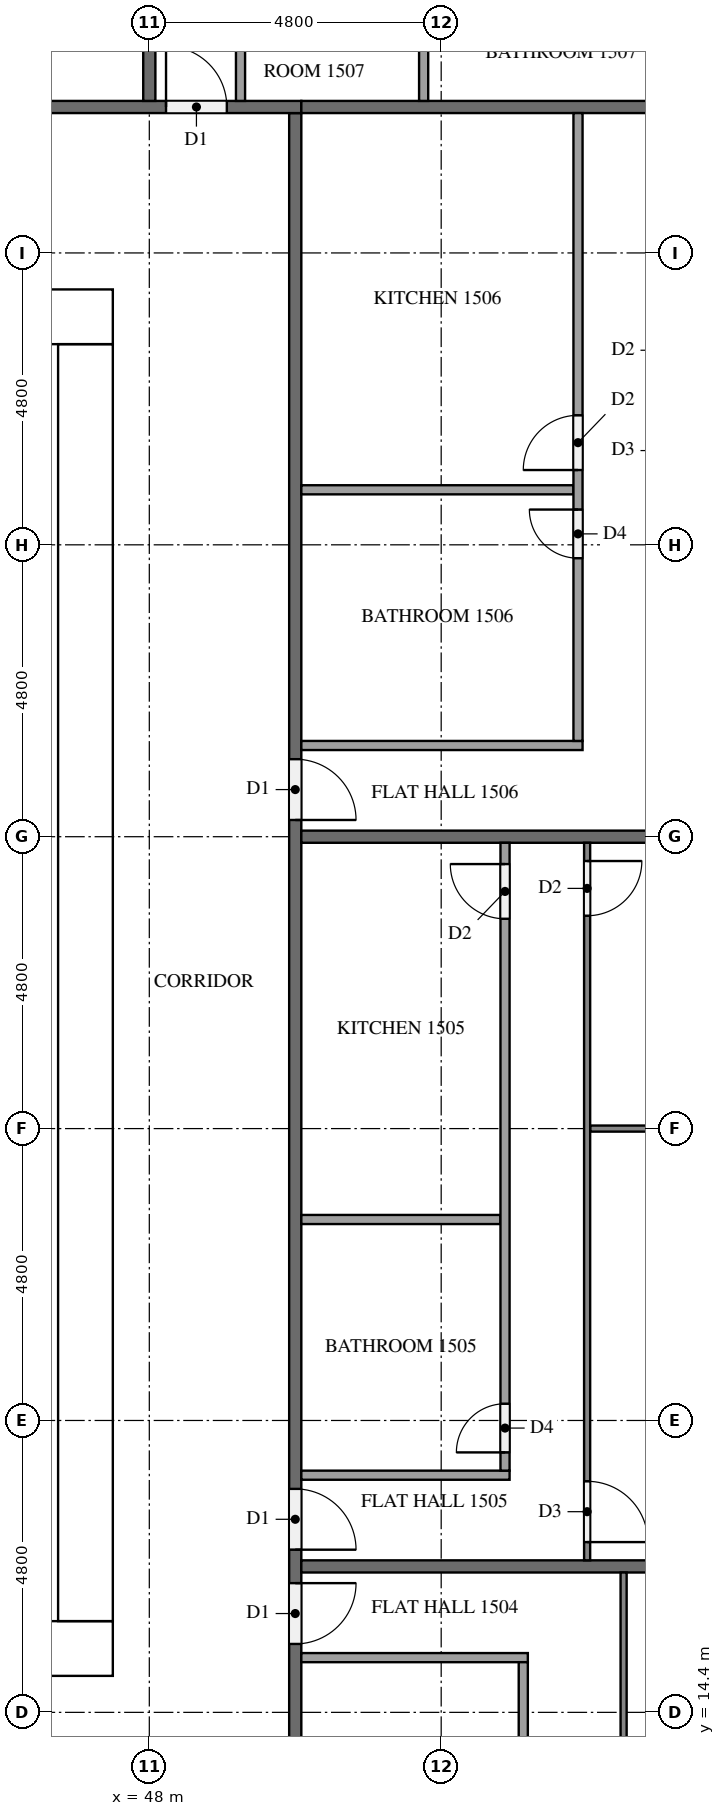
"""IFC4 building model, lengths in metres.
Left out: names, types, materials, properties, quantities, classifications, styles, units other than length and angle.
Written with IfcOpenShell. Run it as: python <this file> out.ifc"""

import sys

from ifc_helpers import new_model, si_unit, direction, frame, frame_2d, origin, place, context, subcontext, project, spatial, rectangle, extrude, element, fill, save


model = new_model("IFC4")
c1 = context("Model", 3, precision=1e-05, world=origin(), true_north=direction((0.0, 1.0)))
c2 = subcontext(c1, "Body", "Model", "MODEL_VIEW")
j1 = project(units=[si_unit("LENGTHUNIT", "METRE"), si_unit("PLANEANGLEUNIT", "RADIAN")], contexts=[c1])
p1 = place(None, origin())
s1 = spatial("IfcSite", under=j1, at=p1, CompositionType="ELEMENT")
p2 = place(p1, origin())
s2 = spatial("IfcBuilding", under=s1, at=p2, CompositionType="ELEMENT")
p3 = place(p2, frame((0.0, 0.0, 62.8)))
s3 = spatial("IfcBuildingStorey", under=s2, at=p3, CompositionType="ELEMENT", Elevation=62.8)
p4 = place(p3, frame((15.0, 15.45, 0.0), z_axis=(0.0, 0.0, 1.0), x_axis=(1.0, 0.0, 0.0)))
e1 = element("IfcWall", 1, at=p4, inside=s3, PredefinedType="SHEAR", context=c2, shape_type="SweptSolid", body=[
    extrude(rectangle(XDim=32.4, YDim=0.9, at=frame_2d((16.2, 0.0))), origin(), (0.0, 0.0, 1.0), 3.2),
])
p5 = place(p4, frame((15.3, 0.0, 0.0)))
e2 = element("IfcOpeningElement", 2, at=p5, cuts=e1, PredefinedType="OPENING", context=c2, shape_type="SweptSolid", body=[
    extrude(rectangle(XDim=1.8, YDim=2.1, at=frame_2d((0.9, 1.05))), frame((0.0, 0.46, 0.0), z_axis=(0.0, -1.0, 0.0), x_axis=(1.0, 0.0, 0.0)), (0.0, 0.0, 1.0), 0.92),
])
p6 = place(p3, frame((15.0, 37.35, 0.0), z_axis=(0.0, 0.0, 1.0), x_axis=(1.0, 0.0, 0.0)))
e3 = element("IfcWall", 3, at=p6, inside=s3, PredefinedType="SHEAR", context=c2, shape_type="SweptSolid", body=[
    extrude(rectangle(XDim=32.4, YDim=0.9, at=frame_2d((16.2, 0.0))), origin(), (0.0, 0.0, 1.0), 3.2),
])
p7 = place(p6, frame((15.3, 0.0, 0.0)))
e4 = element("IfcOpeningElement", 4, at=p7, cuts=e3, PredefinedType="OPENING", context=c2, shape_type="SweptSolid", body=[
    extrude(rectangle(XDim=1.8, YDim=2.1, at=frame_2d((0.9, 1.05))), frame((0.0, 0.46, 0.0), z_axis=(0.0, -1.0, 0.0), x_axis=(1.0, 0.0, 0.0)), (0.0, 0.0, 1.0), 0.92),
])
p8 = place(p6, frame((1.794, 0.0, 0.0)))
e5 = element("IfcOpeningElement", 5, at=p8, cuts=e3, PredefinedType="OPENING", context=c2, shape_type="SweptSolid", body=[
    extrude(rectangle(XDim=1.0, YDim=2.1, at=frame_2d((0.5, 1.05))), frame((0.0, 0.46, 0.0), z_axis=(0.0, -1.0, 0.0), x_axis=(1.0, 0.0, 0.0)), (0.0, 0.0, 1.0), 0.92),
])
p9 = place(p6, frame((5.331, 0.0, 0.0)))
e6 = element("IfcOpeningElement", 6, at=p9, cuts=e3, PredefinedType="OPENING", context=c2, shape_type="SweptSolid", body=[
    extrude(rectangle(XDim=1.0, YDim=2.1, at=frame_2d((0.5, 1.05))), frame((0.0, 0.46, 0.0), z_axis=(0.0, -1.0, 0.0), x_axis=(1.0, 0.0, 0.0)), (0.0, 0.0, 1.0), 0.92),
])
p10 = place(p3, frame((46.95, 15.9, 0.0), z_axis=(0.0, 0.0, 1.0), x_axis=(0.0, 1.0, 0.0)))
e7 = element("IfcWall", 7, at=p10, inside=s3, PredefinedType="SHEAR", context=c2, shape_type="SweptSolid", body=[
    extrude(rectangle(XDim=21.0, YDim=0.9, at=frame_2d((10.5, 0.0))), origin(), (0.0, 0.0, 1.0), 3.2),
])
p11 = place(p10, frame((10.2, 0.0, 0.0)))
e8 = element("IfcOpeningElement", 8, at=p11, cuts=e7, PredefinedType="OPENING", context=c2, shape_type="SweptSolid", body=[
    extrude(rectangle(XDim=1.2, YDim=2.1, at=frame_2d((0.6, 1.05))), frame((0.0, 0.46, 0.0), z_axis=(0.0, -1.0, 0.0), x_axis=(1.0, 0.0, 0.0)), (0.0, 0.0, 1.0), 0.92),
])
p12 = place(p3, frame((50.4, 40.7, 0.0), z_axis=(0.0, 0.0, 1.0), x_axis=(0.0, -1.0, 0.0)))
e9 = element("IfcWall", 9, at=p12, inside=s3, PredefinedType="PARTITIONING", context=c2, shape_type="SweptSolid", body=[
    extrude(rectangle(XDim=28.6, YDim=0.2, at=frame_2d((14.3, 0.0))), origin(), (0.0, 0.0, 1.0), 3.2),
])
p13 = place(p12, frame((24.175, 0.0, 0.0)))
e10 = element("IfcOpeningElement", 10, at=p13, cuts=e9, PredefinedType="OPENING", context=c2, shape_type="SweptSolid", body=[
    extrude(rectangle(XDim=1.0, YDim=2.1, at=frame_2d((0.5, 1.05))), frame((0.0, 0.11, 0.0), z_axis=(0.0, -1.0, 0.0), x_axis=(1.0, 0.0, 0.0)), (0.0, 0.0, 1.0), 0.22),
])
p14 = place(p12, frame((22.625, 0.0, 0.0)))
e11 = element("IfcOpeningElement", 11, at=p14, cuts=e9, PredefinedType="OPENING", context=c2, shape_type="SweptSolid", body=[
    extrude(rectangle(XDim=1.0, YDim=2.1, at=frame_2d((0.5, 1.05))), frame((0.0, 0.11, 0.0), z_axis=(0.0, -1.0, 0.0), x_axis=(1.0, 0.0, 0.0)), (0.0, 0.0, 1.0), 0.22),
])
p15 = place(p12, frame((10.625, 0.0, 0.0)))
e12 = element("IfcOpeningElement", 12, at=p15, cuts=e9, PredefinedType="OPENING", context=c2, shape_type="SweptSolid", body=[
    extrude(rectangle(XDim=1.0, YDim=2.1, at=frame_2d((0.5, 1.05))), frame((0.0, 0.11, 0.0), z_axis=(0.0, -1.0, 0.0), x_axis=(1.0, 0.0, 0.0)), (0.0, 0.0, 1.0), 0.22),
])
p16 = place(p3, frame((11.9, 40.8, 0.0), z_axis=(0.0, 0.0, 1.0), x_axis=(1.0, 0.0, 0.0)))
e13 = element("IfcWall", 13, at=p16, inside=s3, PredefinedType="PARTITIONING", context=c2, shape_type="SweptSolid", body=[
    extrude(rectangle(XDim=38.6, YDim=0.2, at=frame_2d((19.3, 0.0))), origin(), (0.0, 0.0, 1.0), 3.2),
])
p17 = place(p16, frame((36.375, 0.0, 0.0)))
e14 = element("IfcOpeningElement", 14, at=p17, cuts=e13, PredefinedType="OPENING", context=c2, shape_type="SweptSolid", body=[
    extrude(rectangle(XDim=1.0, YDim=2.1, at=frame_2d((0.5, 1.05))), frame((0.0, 0.11, 0.0), z_axis=(0.0, -1.0, 0.0), x_axis=(1.0, 0.0, 0.0)), (0.0, 0.0, 1.0), 0.22),
])
p18 = place(p16, frame((17.125, 0.0, 0.0)))
e15 = element("IfcOpeningElement", 15, at=p18, cuts=e13, PredefinedType="OPENING", context=c2, shape_type="SweptSolid", body=[
    extrude(rectangle(XDim=1.1, YDim=2.1, at=frame_2d((0.55, 1.05))), frame((0.0, 0.11, 0.0), z_axis=(0.0, -1.0, 0.0), x_axis=(1.0, 0.0, 0.0)), (0.0, 0.0, 1.0), 0.22),
])
p19 = place(p16, frame((15.625, 0.0, 0.0)))
e16 = element("IfcOpeningElement", 16, at=p19, cuts=e13, PredefinedType="OPENING", context=c2, shape_type="SweptSolid", body=[
    extrude(rectangle(XDim=1.0, YDim=2.1, at=frame_2d((0.5, 1.05))), frame((0.0, 0.11, 0.0), z_axis=(0.0, -1.0, 0.0), x_axis=(1.0, 0.0, 0.0)), (0.0, 0.0, 1.0), 0.22),
])
p20 = place(p16, frame((1.225, 0.0, 0.0)))
e17 = element("IfcOpeningElement", 17, at=p20, cuts=e13, PredefinedType="OPENING", context=c2, shape_type="SweptSolid", body=[
    extrude(rectangle(XDim=1.0, YDim=2.1, at=frame_2d((0.5, 1.05))), frame((0.0, 0.11, 0.0), z_axis=(0.0, -1.0, 0.0), x_axis=(1.0, 0.0, 0.0)), (0.0, 0.0, 1.0), 0.22),
])
for number, where, z_axis, x_axis in (
    (18, (50.5, 16.8, 0.0), (0.0, 0.0, 1.0), (1.0, 0.0, 0.0)),
    (19, (50.5, 28.8, 0.0), (0.0, 0.0, 1.0), (1.0, 0.0, 0.0)),
    (20, (50.5, 40.8, 0.0), (0.0, 0.0, 1.0), (1.0, 0.0, 0.0)),
):
    element("IfcWall", number, at=place(p3, frame(where, z_axis=z_axis, x_axis=x_axis)), inside=s3, PredefinedType="PARTITIONING", context=c2, shape_type="SweptSolid", body=[
        extrude(rectangle(XDim=11.8, YDim=0.2, at=frame_2d((5.9, 0.0))), origin(), (0.0, 0.0, 1.0), 3.2),
    ])
p21 = place(p3, frame((48.0, 47.575, 0.0), z_axis=(0.0, 0.0, 1.0), x_axis=(0.0, -1.0, 0.0)))
e21 = element("IfcWall", 21, at=p21, inside=s3, PredefinedType="PARTITIONING", context=c2, shape_type="SweptSolid", body=[
    extrude(rectangle(XDim=6.675, YDim=0.2, at=frame_2d((3.337, 0.0))), origin(), (0.0, 0.0, 1.0), 3.2),
])
p22 = place(p3, frame((55.8, 16.7, 0.0), z_axis=(0.0, 0.0, 1.0), x_axis=(0.0, -1.0, 0.0)))
e22 = element("IfcWall", 22, at=p22, inside=s3, PredefinedType="PARTITIONING", context=c2, shape_type="SweptSolid", body=[
    extrude(rectangle(XDim=16.6, YDim=0.1, at=frame_2d((8.3, 0.0))), origin(), (0.0, 0.0, 1.0), 3.2),
])
p23 = place(p22, frame((5.75, 0.0, 0.0)))
e23 = element("IfcOpeningElement", 23, at=p23, cuts=e22, PredefinedType="OPENING", context=c2, shape_type="SweptSolid", body=[
    extrude(rectangle(XDim=1.0, YDim=2.1, at=frame_2d((0.5, 1.05))), frame((0.0, 0.06, 0.0), z_axis=(0.0, -1.0, 0.0), x_axis=(1.0, 0.0, 0.0)), (0.0, 0.0, 1.0), 0.12),
])
p24 = place(p22, frame((7.45, 0.0, 0.0)))
e24 = element("IfcOpeningElement", 24, at=p24, cuts=e22, PredefinedType="OPENING", context=c2, shape_type="SweptSolid", body=[
    extrude(rectangle(XDim=0.9, YDim=2.1, at=frame_2d((0.45, 1.05))), frame((0.0, 0.06, 0.0), z_axis=(0.0, -1.0, 0.0), x_axis=(1.0, 0.0, 0.0)), (0.0, 0.0, 1.0), 0.12),
])
p25 = place(p22, frame((15.2, 0.0, 0.0)))
e25 = element("IfcOpeningElement", 25, at=p25, cuts=e22, PredefinedType="OPENING", context=c2, shape_type="SweptSolid", body=[
    extrude(rectangle(XDim=0.9, YDim=2.1, at=frame_2d((0.45, 1.05))), frame((0.0, 0.06, 0.0), z_axis=(0.0, -1.0, 0.0), x_axis=(1.0, 0.0, 0.0)), (0.0, 0.0, 1.0), 0.12),
])
p26 = place(p3, frame((50.5, 15.3, 0.0), z_axis=(0.0, 0.0, 1.0), x_axis=(1.0, 0.0, 0.0)))
e26 = element("IfcWall", 26, at=p26, inside=s3, PredefinedType="PARTITIONING", context=c2, shape_type="SweptSolid", body=[
    extrude(rectangle(XDim=3.725, YDim=0.15, at=frame_2d((1.863, 0.0))), origin(), (0.0, 0.0, 1.0), 3.2),
])
p27 = place(p3, frame((54.15, 0.1, 0.0), z_axis=(0.0, 0.0, 1.0), x_axis=(0.0, 1.0, 0.0)))
e27 = element("IfcWall", 27, at=p27, inside=s3, PredefinedType="PARTITIONING", context=c2, shape_type="SweptSolid", body=[
    extrude(rectangle(XDim=15.125, YDim=0.15, at=frame_2d((7.562, 0.0))), origin(), (0.0, 0.0, 1.0), 3.2),
])
p28 = place(p27, frame((10.796, 0.0, 0.0)))
e28 = element("IfcOpeningElement", 28, at=p28, cuts=e27, PredefinedType="OPENING", context=c2, shape_type="SweptSolid", body=[
    extrude(rectangle(XDim=0.9, YDim=2.1, at=frame_2d((0.45, 1.05))), frame((0.0, 0.085, 0.0), z_axis=(0.0, -1.0, 0.0), x_axis=(1.0, 0.0, 0.0)), (0.0, 0.0, 1.0), 0.17),
])
p29 = place(p27, frame((9.246, 0.0, 0.0)))
e29 = element("IfcOpeningElement", 29, at=p29, cuts=e27, PredefinedType="OPENING", context=c2, shape_type="SweptSolid", body=[
    extrude(rectangle(XDim=0.9, YDim=2.1, at=frame_2d((0.45, 1.05))), frame((0.0, 0.085, 0.0), z_axis=(0.0, -1.0, 0.0), x_axis=(1.0, 0.0, 0.0)), (0.0, 0.0, 1.0), 0.17),
])
p30 = place(p27, frame((0.35, 0.0, 0.0)))
e30 = element("IfcOpeningElement", 30, at=p30, cuts=e27, PredefinedType="OPENING", context=c2, shape_type="SweptSolid", body=[
    extrude(rectangle(XDim=0.8, YDim=2.1, at=frame_2d((0.4, 1.05))), frame((0.0, 0.085, 0.0), z_axis=(0.0, -1.0, 0.0), x_axis=(1.0, 0.0, 0.0)), (0.0, 0.0, 1.0), 0.17),
])
p31 = place(p3, frame((55.25, 24.0, 0.0), z_axis=(0.0, 0.0, 1.0), x_axis=(1.0, 0.0, 0.0)))
e31 = element("IfcWall", 31, at=p31, inside=s3, PredefinedType="PARTITIONING", context=c2, shape_type="SweptSolid", body=[
    extrude(rectangle(XDim=6.725, YDim=0.1, at=frame_2d((3.363, 0.0))), origin(), (0.0, 0.0, 1.0), 3.2),
])
p32 = place(p3, frame((55.2, 28.7, 0.0), z_axis=(0.0, 0.0, 1.0), x_axis=(0.0, -1.0, 0.0)))
e32 = element("IfcWall", 32, at=p32, inside=s3, PredefinedType="PARTITIONING", context=c2, shape_type="SweptSolid", body=[
    extrude(rectangle(XDim=11.8, YDim=0.1, at=frame_2d((5.9, 0.0))), origin(), (0.0, 0.0, 1.0), 3.2),
])
p33 = place(p32, frame((10.5, 0.0, 0.0)))
e33 = element("IfcOpeningElement", 33, at=p33, cuts=e32, PredefinedType="OPENING", context=c2, shape_type="SweptSolid", body=[
    extrude(rectangle(XDim=1.0, YDim=2.1, at=frame_2d((0.5, 1.05))), frame((0.0, 0.06, 0.0), z_axis=(0.0, -1.0, 0.0), x_axis=(1.0, 0.0, 0.0)), (0.0, 0.0, 1.0), 0.12),
])
p34 = place(p32, frame((0.3, 0.0, 0.0)))
e34 = element("IfcOpeningElement", 34, at=p34, cuts=e32, PredefinedType="OPENING", context=c2, shape_type="SweptSolid", body=[
    extrude(rectangle(XDim=0.9, YDim=2.1, at=frame_2d((0.45, 1.05))), frame((0.0, 0.06, 0.0), z_axis=(0.0, -1.0, 0.0), x_axis=(1.0, 0.0, 0.0)), (0.0, 0.0, 1.0), 0.12),
])
p35 = place(p3, frame((50.5, 22.505, 0.0), z_axis=(0.0, 0.0, 1.0), x_axis=(1.0, 0.0, 0.0)))
e35 = element("IfcWall", 35, at=p35, inside=s3, PredefinedType="PARTITIONING", context=c2, shape_type="SweptSolid", body=[
    extrude(rectangle(XDim=3.275, YDim=0.15, at=frame_2d((1.637, 0.0))), origin(), (0.0, 0.0, 1.0), 3.2),
])
p36 = place(p3, frame((50.5, 18.3, 0.0), z_axis=(0.0, 0.0, 1.0), x_axis=(1.0, 0.0, 0.0)))
e36 = element("IfcWall", 36, at=p36, inside=s3, PredefinedType="PARTITIONING", context=c2, shape_type="SweptSolid", body=[
    extrude(rectangle(XDim=3.425, YDim=0.15, at=frame_2d((1.712, 0.0))), origin(), (0.0, 0.0, 1.0), 3.2),
])
p37 = place(p3, frame((53.85, 18.375, 0.0), z_axis=(0.0, 0.0, 1.0), x_axis=(0.0, 1.0, 0.0)))
e37 = element("IfcWall", 37, at=p37, inside=s3, PredefinedType="PARTITIONING", context=c2, shape_type="SweptSolid", body=[
    extrude(rectangle(XDim=10.325, YDim=0.15, at=frame_2d((5.163, 0.0))), origin(), (0.0, 0.0, 1.0), 3.2),
])
p38 = place(p37, frame((0.3, 0.0, 0.0)))
e38 = element("IfcOpeningElement", 38, at=p38, cuts=e37, PredefinedType="OPENING", context=c2, shape_type="SweptSolid", body=[
    extrude(rectangle(XDim=0.8, YDim=2.1, at=frame_2d((0.4, 1.05))), frame((0.0, 0.085, 0.0), z_axis=(0.0, -1.0, 0.0), x_axis=(1.0, 0.0, 0.0)), (0.0, 0.0, 1.0), 0.17),
])
p39 = place(p37, frame((9.075, 0.0, 0.0)))
e39 = element("IfcOpeningElement", 39, at=p39, cuts=e37, PredefinedType="OPENING", context=c2, shape_type="SweptSolid", body=[
    extrude(rectangle(XDim=0.9, YDim=2.1, at=frame_2d((0.45, 1.05))), frame((0.0, 0.085, 0.0), z_axis=(0.0, -1.0, 0.0), x_axis=(1.0, 0.0, 0.0)), (0.0, 0.0, 1.0), 0.17),
])
p40 = place(p3, frame((50.5, 34.505, 0.0), z_axis=(0.0, 0.0, 1.0), x_axis=(1.0, 0.0, 0.0)))
e40 = element("IfcWall", 40, at=p40, inside=s3, PredefinedType="PARTITIONING", context=c2, shape_type="SweptSolid", body=[
    extrude(rectangle(XDim=4.475, YDim=0.15, at=frame_2d((2.238, 0.0))), origin(), (0.0, 0.0, 1.0), 3.2),
])
p41 = place(p3, frame((50.5, 30.3, 0.0), z_axis=(0.0, 0.0, 1.0), x_axis=(1.0, 0.0, 0.0)))
e41 = element("IfcWall", 41, at=p41, inside=s3, PredefinedType="PARTITIONING", context=c2, shape_type="SweptSolid", body=[
    extrude(rectangle(XDim=4.625, YDim=0.15, at=frame_2d((2.312, 0.0))), origin(), (0.0, 0.0, 1.0), 3.2),
])
p42 = place(p3, frame((55.05, 30.375, 0.0), z_axis=(0.0, 0.0, 1.0), x_axis=(0.0, 1.0, 0.0)))
e42 = element("IfcWall", 42, at=p42, inside=s3, PredefinedType="PARTITIONING", context=c2, shape_type="SweptSolid", body=[
    extrude(rectangle(XDim=10.325, YDim=0.15, at=frame_2d((5.163, 0.0))), origin(), (0.0, 0.0, 1.0), 3.2),
])
p43 = place(p42, frame((3.005, 0.0, 0.0)))
e43 = element("IfcOpeningElement", 43, at=p43, cuts=e42, PredefinedType="OPENING", context=c2, shape_type="SweptSolid", body=[
    extrude(rectangle(XDim=0.8, YDim=2.1, at=frame_2d((0.4, 1.05))), frame((0.0, 0.085, 0.0), z_axis=(0.0, -1.0, 0.0), x_axis=(1.0, 0.0, 0.0)), (0.0, 0.0, 1.0), 0.17),
])
p44 = place(p42, frame((4.455, 0.0, 0.0)))
e44 = element("IfcOpeningElement", 44, at=p44, cuts=e42, PredefinedType="OPENING", context=c2, shape_type="SweptSolid", body=[
    extrude(rectangle(XDim=0.9, YDim=2.1, at=frame_2d((0.45, 1.05))), frame((0.0, 0.085, 0.0), z_axis=(0.0, -1.0, 0.0), x_axis=(1.0, 0.0, 0.0)), (0.0, 0.0, 1.0), 0.17),
])
p45 = place(p3, frame((52.511, 40.9, 0.0), z_axis=(0.0, 0.0, 1.0), x_axis=(0.0, 1.0, 0.0)))
e45 = element("IfcWall", 45, at=p45, inside=s3, PredefinedType="PARTITIONING", context=c2, shape_type="SweptSolid", body=[
    extrude(rectangle(XDim=1.775, YDim=0.15, at=frame_2d((0.888, 0.0))), origin(), (0.0, 0.0, 1.0), 3.2),
])
p46 = place(p3, frame((49.5, 40.9, 0.0), z_axis=(0.0, 0.0, 1.0), x_axis=(0.0, 1.0, 0.0)))
e46 = element("IfcWall", 46, at=p46, inside=s3, PredefinedType="PARTITIONING", context=c2, shape_type="SweptSolid", body=[
    extrude(rectangle(XDim=1.925, YDim=0.15, at=frame_2d((0.962, 0.0))), origin(), (0.0, 0.0, 1.0), 3.2),
])
p47 = place(p11, origin())
e47 = element("IfcDoor", 47, at=p47, inside=s3, OperationType="SINGLE_SWING_LEFT", PredefinedType="DOOR", context=c2, shape_type="SweptSolid", body=[
    extrude(rectangle(XDim=1.2, YDim=2.1, at=frame_2d((0.6, 1.05))), frame((0.0, 0.025, 0.0), z_axis=(0.0, -1.0, 0.0), x_axis=(1.0, 0.0, 0.0)), (0.0, 0.0, 1.0), 0.05),
])
fill(e8, e47)
p48 = place(p13, origin())
e48 = element("IfcDoor", 48, at=p48, inside=s3, OperationType="SINGLE_SWING_LEFT", PredefinedType="DOOR", context=c2, shape_type="SweptSolid", body=[
    extrude(rectangle(XDim=1.0, YDim=2.1, at=frame_2d((0.5, 1.05))), frame((0.0, 0.025, 0.0), z_axis=(0.0, -1.0, 0.0), x_axis=(1.0, 0.0, 0.0)), (0.0, 0.0, 1.0), 0.05),
])
fill(e10, e48)
p49 = place(p14, origin())
e49 = element("IfcDoor", 49, at=p49, inside=s3, OperationType="SINGLE_SWING_RIGHT", PredefinedType="DOOR", context=c2, shape_type="SweptSolid", body=[
    extrude(rectangle(XDim=1.0, YDim=2.1, at=frame_2d((0.5, 1.05))), frame((0.0, 0.025, 0.0), z_axis=(0.0, -1.0, 0.0), x_axis=(1.0, 0.0, 0.0)), (0.0, 0.0, 1.0), 0.05),
])
fill(e11, e49)
p50 = place(p15, origin())
e50 = element("IfcDoor", 50, at=p50, inside=s3, OperationType="SINGLE_SWING_RIGHT", PredefinedType="DOOR", context=c2, shape_type="SweptSolid", body=[
    extrude(rectangle(XDim=1.0, YDim=2.1, at=frame_2d((0.5, 1.05))), frame((0.0, 0.025, 0.0), z_axis=(0.0, -1.0, 0.0), x_axis=(1.0, 0.0, 0.0)), (0.0, 0.0, 1.0), 0.05),
])
fill(e12, e50)
p51 = place(p17, origin())
e51 = element("IfcDoor", 51, at=p51, inside=s3, OperationType="SINGLE_SWING_LEFT", PredefinedType="DOOR", context=c2, shape_type="SweptSolid", body=[
    extrude(rectangle(XDim=1.0, YDim=2.1, at=frame_2d((0.5, 1.05))), frame((0.0, 0.025, 0.0), z_axis=(0.0, -1.0, 0.0), x_axis=(1.0, 0.0, 0.0)), (0.0, 0.0, 1.0), 0.05),
])
fill(e14, e51)
p52 = place(p33, origin())
e52 = element("IfcDoor", 52, at=p52, inside=s3, OperationType="SINGLE_SWING_RIGHT", PredefinedType="DOOR", context=c2, shape_type="SweptSolid", body=[
    extrude(rectangle(XDim=1.0, YDim=2.1, at=frame_2d((0.5, 1.05))), frame((0.0, 0.025, 0.0), z_axis=(0.0, -1.0, 0.0), x_axis=(1.0, 0.0, 0.0)), (0.0, 0.0, 1.0), 0.05),
])
fill(e33, e52)
p53 = place(p34, origin())
e53 = element("IfcDoor", 53, at=p53, inside=s3, OperationType="SINGLE_SWING_LEFT", PredefinedType="DOOR", context=c2, shape_type="SweptSolid", body=[
    extrude(rectangle(XDim=0.9, YDim=2.1, at=frame_2d((0.45, 1.05))), frame((0.0, 0.025, 0.0), z_axis=(0.0, -1.0, 0.0), x_axis=(1.0, 0.0, 0.0)), (0.0, 0.0, 1.0), 0.05),
])
fill(e34, e53)
p54 = place(p38, origin())
e54 = element("IfcDoor", 54, at=p54, inside=s3, OperationType="SINGLE_SWING_LEFT", PredefinedType="DOOR", context=c2, shape_type="SweptSolid", body=[
    extrude(rectangle(XDim=0.8, YDim=2.1, at=frame_2d((0.4, 1.05))), frame((0.0, 0.025, 0.0), z_axis=(0.0, -1.0, 0.0), x_axis=(1.0, 0.0, 0.0)), (0.0, 0.0, 1.0), 0.05),
])
fill(e38, e54)
p55 = place(p39, origin())
e55 = element("IfcDoor", 55, at=p55, inside=s3, OperationType="SINGLE_SWING_RIGHT", PredefinedType="DOOR", context=c2, shape_type="SweptSolid", body=[
    extrude(rectangle(XDim=0.9, YDim=2.1, at=frame_2d((0.45, 1.05))), frame((0.0, 0.025, 0.0), z_axis=(0.0, -1.0, 0.0), x_axis=(1.0, 0.0, 0.0)), (0.0, 0.0, 1.0), 0.05),
])
fill(e39, e55)
p56 = place(p43, origin())
e56 = element("IfcDoor", 56, at=p56, inside=s3, OperationType="SINGLE_SWING_RIGHT", PredefinedType="DOOR", context=c2, shape_type="SweptSolid", body=[
    extrude(rectangle(XDim=0.8, YDim=2.1, at=frame_2d((0.4, 1.05))), frame((0.0, 0.025, 0.0), z_axis=(0.0, -1.0, 0.0), x_axis=(1.0, 0.0, 0.0)), (0.0, 0.0, 1.0), 0.05),
])
fill(e43, e56)
p57 = place(p44, origin())
e57 = element("IfcDoor", 57, at=p57, inside=s3, OperationType="SINGLE_SWING_LEFT", PredefinedType="DOOR", context=c2, shape_type="SweptSolid", body=[
    extrude(rectangle(XDim=0.9, YDim=2.1, at=frame_2d((0.45, 1.05))), frame((0.0, 0.025, 0.0), z_axis=(0.0, -1.0, 0.0), x_axis=(1.0, 0.0, 0.0)), (0.0, 0.0, 1.0), 0.05),
])
fill(e44, e57)
save(model, sys.argv[1])
